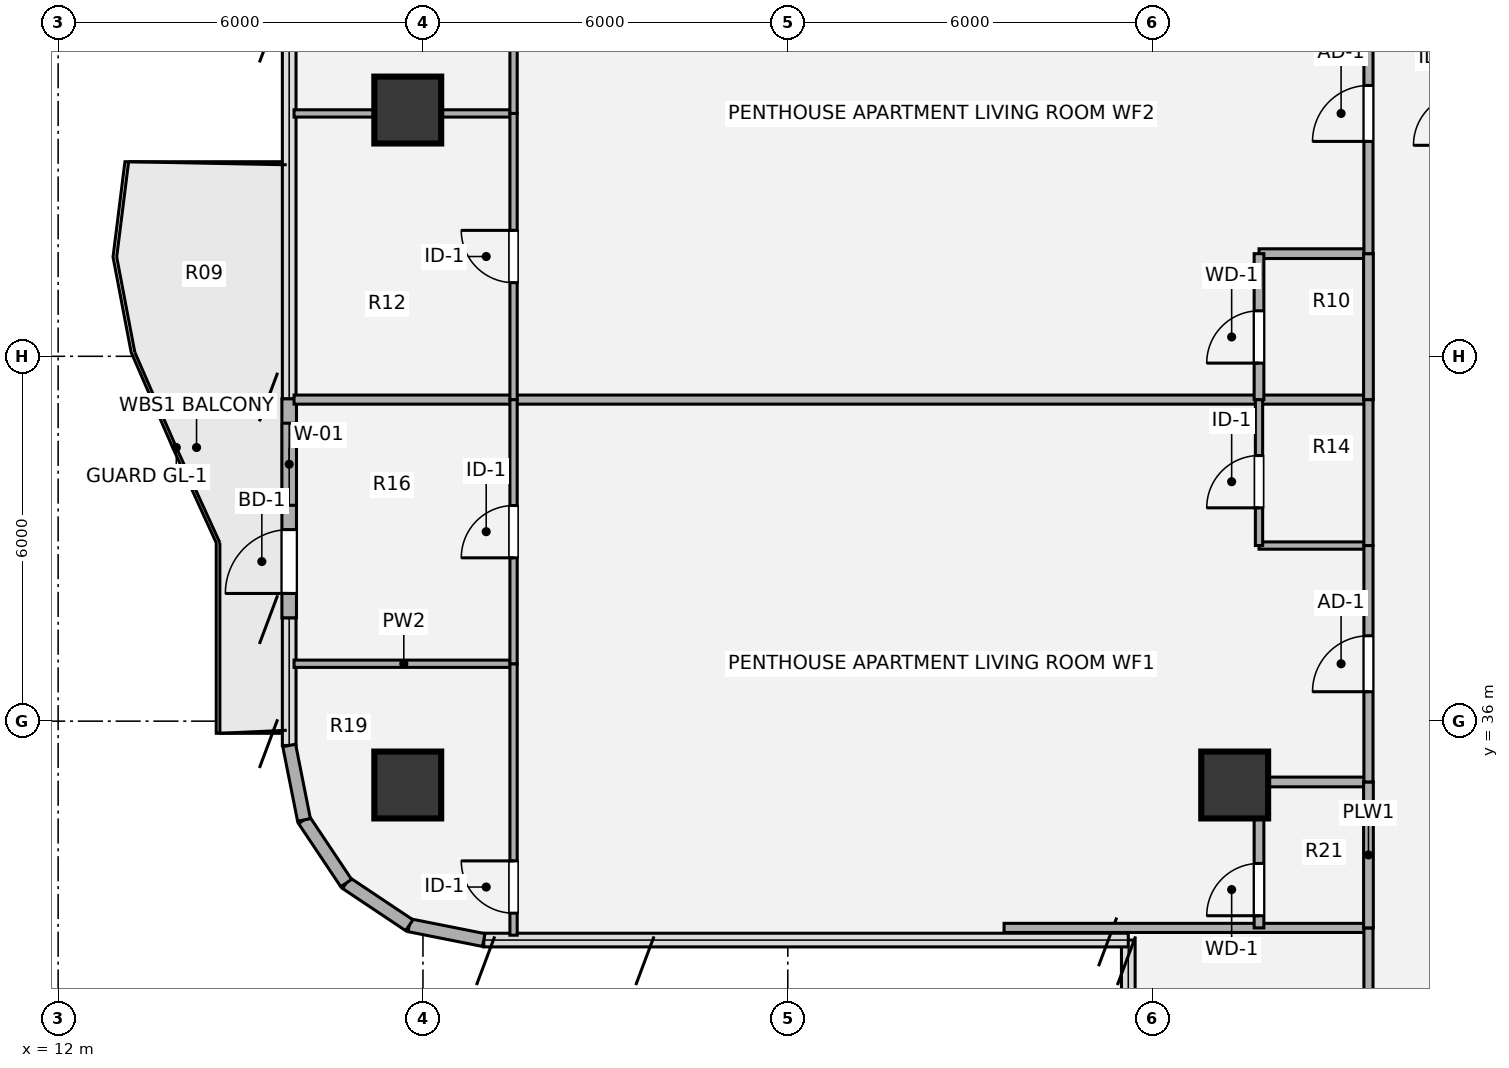
"""IFC4 building model, lengths in metres.
Left out: names, types, materials, properties, quantities, classifications, styles, units other than length and angle.
Written with IfcOpenShell. Run it as: python <this file> out.ifc"""

import sys

from ifc_helpers import new_model, si_unit, direction, frame, frame_2d, origin, origin_2d, place, context, subcontext, project, spatial, rectangle, hollow_circle, extrude, source, transform, mapped, element, fill, save


model = new_model("IFC4")
c1 = context("Model", 3, precision=1e-05, world=origin(), true_north=direction((0.0, 1.0)))
c2 = subcontext(c1, "Body", "Model", "MODEL_VIEW")
j1 = project(units=[si_unit("LENGTHUNIT", "METRE"), si_unit("PLANEANGLEUNIT", "RADIAN")], contexts=[c1])
p1 = place(None, origin())
s1 = spatial("IfcSite", under=j1, at=p1, CompositionType="ELEMENT")
p2 = place(p1, origin())
s2 = spatial("IfcBuilding", under=s1, at=p2, CompositionType="ELEMENT")
p3 = place(p2, frame((0.0, 0.0, 160.2)))
s3 = spatial("IfcBuildingStorey", under=s2, at=p3, CompositionType="ELEMENT", Elevation=160.2)
m1 = source(origin(), c2, "Body", "SweptSolid", [
    extrude(hollow_circle(Radius=0.55, WallThickness=0.04, at=origin_2d()), origin(), (0.0, 0.0, 1.0), 3.78),
])
for number, where, z_axis, x_axis in (
    (1, (17.75, 34.95, 0.0), (0.0, 0.0, 1.0), (1.0, 0.0, 0.0)),
    (2, (17.75, 46.05, 0.0), (0.0, 0.0, 1.0), (1.0, 0.0, 0.0)),
    (3, (31.35, 34.95, 0.0), (0.0, 0.0, 1.0), (1.0, 0.0, 0.0)),
):
    element("IfcColumn", number, at=place(p3, frame(where, z_axis=z_axis, x_axis=x_axis)), inside=s3, PredefinedType="COLUMN", context=c2, shape_type="MappedRepresentation", body=[
        mapped(m1, transform((0.0, 0.0, 0.0), x_axis=(1.0, 0.0, 0.0), y_axis=(0.0, 1.0, 0.0), z_axis=(0.0, 0.0, 1.0), scale=1.0)),
    ])
for number, where, z_axis, x_axis in (
    (4, (19.0, 32.4, 0.0), (0.0, 0.0, 1.0), (-0.981, 0.195, 0.0)),
    (5, (17.775, 32.644, 0.0), (0.0, 0.0, 1.0), (-0.831, 0.556, 0.0)),
    (6, (16.737, 33.337, 0.0), (0.0, 0.0, 1.0), (-0.556, 0.831, 0.0)),
    (7, (16.044, 34.375, 0.0), (0.0, 0.0, 1.0), (-0.195, 0.981, 0.0)),
):
    element("IfcWall", number, at=place(p3, frame(where, z_axis=z_axis, x_axis=x_axis)), inside=s3, PredefinedType="SOLIDWALL", context=c2, shape_type="SweptSolid", body=[
        extrude(rectangle(XDim=1.249, YDim=0.215, at=frame_2d((0.624, 0.0))), origin(), (0.0, 0.0, 1.0), 3.53),
    ])
p4 = place(p3, frame((15.8, 37.7, 0.0), z_axis=(0.0, 0.0, 1.0), x_axis=(0.0, 1.0, 0.0)))
e8 = element("IfcWall", 8, at=p4, inside=s3, PredefinedType="SOLIDWALL", context=c2, shape_type="SweptSolid", body=[
    extrude(rectangle(XDim=3.6, YDim=0.24, at=frame_2d((1.8, 0.0))), origin(), (0.0, 0.0, 1.0), 3.53),
])
p5 = place(p4, frame((0.4, 0.0, 0.0)))
e9 = element("IfcOpeningElement", 9, at=p5, cuts=e8, PredefinedType="OPENING", context=c2, shape_type="SweptSolid", body=[
    extrude(rectangle(XDim=1.05, YDim=2.15, at=origin_2d()), frame((0.525, 0.13, 1.075), z_axis=(0.0, -1.0, 0.0), x_axis=(1.0, 0.0, 0.0)), (0.0, 0.0, 1.0), 0.26),
])
p6 = place(p4, frame((1.85, 0.0, 0.85)))
e10 = element("IfcOpeningElement", 10, at=p6, cuts=e8, PredefinedType="OPENING", context=c2, shape_type="SweptSolid", body=[
    extrude(rectangle(XDim=1.35, YDim=1.35, at=origin_2d()), frame((0.675, 0.13, 0.675), z_axis=(0.0, -1.0, 0.0), x_axis=(1.0, 0.0, 0.0)), (0.0, 0.0, 1.0), 0.26),
])
p7 = place(p3, frame((27.557, 32.6, 0.0), z_axis=(0.0, 0.0, 1.0), x_axis=(1.0, 0.0, 0.0)))
e11 = element("IfcWall", 11, at=p7, inside=s3, PredefinedType="PARTITIONING", context=c2, shape_type="SweptSolid", body=[
    extrude(rectangle(XDim=5.993, YDim=0.15, at=frame_2d((2.997, 0.0))), origin(), (0.0, 0.0, 1.0), 3.5),
])
p8 = place(p3, frame((31.75, 35.0, 0.0), z_axis=(0.0, 0.0, 1.0), x_axis=(1.0, 0.0, 0.0)))
e12 = element("IfcWall", 12, at=p8, inside=s3, PredefinedType="PLUMBINGWALL", context=c2, shape_type="SweptSolid", body=[
    extrude(rectangle(XDim=1.8, YDim=0.16, at=frame_2d((0.9, 0.0))), origin(), (0.0, 0.0, 1.0), 2.903),
])
p9 = place(p3, frame((15.88, 36.944, 0.0), z_axis=(0.0, 0.0, 1.0), x_axis=(1.0, 0.0, 0.0)))
e13 = element("IfcWall", 13, at=p9, inside=s3, PredefinedType="PARTITIONING", context=c2, shape_type="SweptSolid", body=[
    extrude(rectangle(XDim=3.61, YDim=0.12, at=frame_2d((1.805, 0.0))), origin(), (0.0, 0.0, 1.0), 2.982),
])
p10 = place(p3, frame((31.75, 38.888, 0.0), z_axis=(0.0, 0.0, 1.0), x_axis=(1.0, 0.0, 0.0)))
e14 = element("IfcWall", 14, at=p10, inside=s3, PredefinedType="PARTITIONING", context=c2, shape_type="SweptSolid", body=[
    extrude(rectangle(XDim=1.8, YDim=0.12, at=frame_2d((0.9, 0.0))), origin(), (0.0, 0.0, 1.0), 3.259),
])
p11 = place(p3, frame((15.88, 41.288, 0.0), z_axis=(0.0, 0.0, 1.0), x_axis=(1.0, 0.0, 0.0)))
e15 = element("IfcWall", 15, at=p11, inside=s3, PredefinedType="PARTITIONING", context=c2, shape_type="SweptSolid", body=[
    extrude(rectangle(XDim=17.67, YDim=0.15, at=frame_2d((8.835, 0.0))), origin(), (0.0, 0.0, 1.0), 2.982),
])
p12 = place(p3, frame((31.75, 43.688, 0.0), z_axis=(0.0, 0.0, 1.0), x_axis=(1.0, 0.0, 0.0)))
e16 = element("IfcWall", 16, at=p12, inside=s3, PredefinedType="PLUMBINGWALL", context=c2, shape_type="SweptSolid", body=[
    extrude(rectangle(XDim=1.8, YDim=0.16, at=frame_2d((0.9, 0.0))), origin(), (0.0, 0.0, 1.0), 3.259),
])
p13 = place(p3, frame((15.88, 45.994, 0.0), z_axis=(0.0, 0.0, 1.0), x_axis=(1.0, 0.0, 0.0)))
e17 = element("IfcWall", 17, at=p13, inside=s3, PredefinedType="PARTITIONING", context=c2, shape_type="SweptSolid", body=[
    extrude(rectangle(XDim=3.61, YDim=0.12, at=frame_2d((1.805, 0.0))), origin(), (0.0, 0.0, 1.0), 2.903),
])
p14 = place(p3, frame((19.49, 32.48, 0.0), z_axis=(0.0, 0.0, 1.0), x_axis=(0.0, 1.0, 0.0)))
e18 = element("IfcWall", 18, at=p14, inside=s3, PredefinedType="PARTITIONING", context=c2, shape_type="SweptSolid", body=[
    extrude(rectangle(XDim=4.464, YDim=0.12, at=frame_2d((2.232, 0.0))), origin(), (0.0, 0.0, 1.0), 3.5),
])
p15 = place(p14, frame((0.362, 0.0, 0.0)))
e19 = element("IfcOpeningElement", 19, at=p15, cuts=e18, PredefinedType="OPENING", context=c2, shape_type="SweptSolid", body=[
    extrude(rectangle(XDim=0.86, YDim=2.1, at=origin_2d()), frame((0.43, 0.07, 1.05), z_axis=(0.0, -1.0, 0.0), x_axis=(1.0, 0.0, 0.0)), (0.0, 0.0, 1.0), 0.14),
])
p16 = place(p3, frame((19.49, 36.944, 0.0), z_axis=(0.0, 0.0, 1.0), x_axis=(0.0, 1.0, 0.0)))
e20 = element("IfcWall", 20, at=p16, inside=s3, PredefinedType="PARTITIONING", context=c2, shape_type="SweptSolid", body=[
    extrude(rectangle(XDim=4.344, YDim=0.12, at=frame_2d((2.172, 0.0))), origin(), (0.0, 0.0, 1.0), 3.5),
])
p17 = place(p16, frame((1.742, 0.0, 0.0)))
e21 = element("IfcOpeningElement", 21, at=p17, cuts=e20, PredefinedType="OPENING", context=c2, shape_type="SweptSolid", body=[
    extrude(rectangle(XDim=0.86, YDim=2.1, at=origin_2d()), frame((0.43, 0.07, 1.05), z_axis=(0.0, -1.0, 0.0), x_axis=(1.0, 0.0, 0.0)), (0.0, 0.0, 1.0), 0.14),
])
p18 = place(p3, frame((19.49, 41.288, 0.0), z_axis=(0.0, 0.0, 1.0), x_axis=(0.0, 1.0, 0.0)))
e22 = element("IfcWall", 22, at=p18, inside=s3, PredefinedType="PARTITIONING", context=c2, shape_type="SweptSolid", body=[
    extrude(rectangle(XDim=4.706, YDim=0.12, at=frame_2d((2.353, 0.0))), origin(), (0.0, 0.0, 1.0), 3.5),
])
p19 = place(p18, frame((1.923, 0.0, 0.0)))
e23 = element("IfcOpeningElement", 23, at=p19, cuts=e22, PredefinedType="OPENING", context=c2, shape_type="SweptSolid", body=[
    extrude(rectangle(XDim=0.86, YDim=2.1, at=origin_2d()), frame((0.43, 0.07, 1.05), z_axis=(0.0, -1.0, 0.0), x_axis=(1.0, 0.0, 0.0)), (0.0, 0.0, 1.0), 0.14),
])
p20 = place(p3, frame((19.49, 45.994, 0.0), z_axis=(0.0, 0.0, 1.0), x_axis=(0.0, 1.0, 0.0)))
e24 = element("IfcWall", 24, at=p20, inside=s3, PredefinedType="PARTITIONING", context=c2, shape_type="SweptSolid", body=[
    extrude(rectangle(XDim=4.706, YDim=0.12, at=frame_2d((2.353, 0.0))), origin(), (0.0, 0.0, 1.0), 3.5),
])
p21 = place(p20, frame((1.923, 0.0, 0.0)))
e25 = element("IfcOpeningElement", 25, at=p21, cuts=e24, PredefinedType="OPENING", context=c2, shape_type="SweptSolid", body=[
    extrude(rectangle(XDim=0.86, YDim=2.1, at=origin_2d()), frame((0.43, 0.07, 1.05), z_axis=(0.0, -1.0, 0.0), x_axis=(1.0, 0.0, 0.0)), (0.0, 0.0, 1.0), 0.14),
])
p22 = place(p3, frame((31.75, 32.6, 0.0), z_axis=(0.0, 0.0, 1.0), x_axis=(0.0, 1.0, 0.0)))
e26 = element("IfcWall", 26, at=p22, inside=s3, PredefinedType="PLUMBINGWALL", context=c2, shape_type="SweptSolid", body=[
    extrude(rectangle(XDim=2.4, YDim=0.16, at=frame_2d((1.2, 0.0))), origin(), (0.0, 0.0, 1.0), 3.5),
])
p23 = place(p22, frame((0.2, 0.0, 0.0)))
e27 = element("IfcOpeningElement", 27, at=p23, cuts=e26, PredefinedType="OPENING", context=c2, shape_type="SweptSolid", body=[
    extrude(rectangle(XDim=0.86, YDim=2.1, at=origin_2d()), frame((0.43, 0.09, 1.05), z_axis=(0.0, -1.0, 0.0), x_axis=(1.0, 0.0, 0.0)), (0.0, 0.0, 1.0), 0.18),
])
p24 = place(p3, frame((31.75, 38.888, 0.0), z_axis=(0.0, 0.0, 1.0), x_axis=(0.0, 1.0, 0.0)))
e28 = element("IfcWall", 28, at=p24, inside=s3, PredefinedType="PARTITIONING", context=c2, shape_type="SweptSolid", body=[
    extrude(rectangle(XDim=2.4, YDim=0.12, at=frame_2d((1.2, 0.0))), origin(), (0.0, 0.0, 1.0), 3.5),
])
p25 = place(p24, frame((0.62, 0.0, 0.0)))
e29 = element("IfcOpeningElement", 29, at=p25, cuts=e28, PredefinedType="OPENING", context=c2, shape_type="SweptSolid", body=[
    extrude(rectangle(XDim=0.86, YDim=2.1, at=origin_2d()), frame((0.43, 0.07, 1.05), z_axis=(0.0, -1.0, 0.0), x_axis=(1.0, 0.0, 0.0)), (0.0, 0.0, 1.0), 0.14),
])
p26 = place(p3, frame((31.75, 41.288, 0.0), z_axis=(0.0, 0.0, 1.0), x_axis=(0.0, 1.0, 0.0)))
e30 = element("IfcWall", 30, at=p26, inside=s3, PredefinedType="PLUMBINGWALL", context=c2, shape_type="SweptSolid", body=[
    extrude(rectangle(XDim=2.4, YDim=0.16, at=frame_2d((1.2, 0.0))), origin(), (0.0, 0.0, 1.0), 3.5),
])
p27 = place(p26, frame((0.6, 0.0, 0.0)))
e31 = element("IfcOpeningElement", 31, at=p27, cuts=e30, PredefinedType="OPENING", context=c2, shape_type="SweptSolid", body=[
    extrude(rectangle(XDim=0.86, YDim=2.1, at=origin_2d()), frame((0.43, 0.09, 1.05), z_axis=(0.0, -1.0, 0.0), x_axis=(1.0, 0.0, 0.0)), (0.0, 0.0, 1.0), 0.18),
])
p28 = place(p3, frame((33.55, 21.2, 0.0), z_axis=(0.0, 0.0, 1.0), x_axis=(0.0, 1.0, 0.0)))
e32 = element("IfcWall", 32, at=p28, inside=s3, PredefinedType="PARTITIONING", context=c2, shape_type="SweptSolid", body=[
    extrude(rectangle(XDim=11.4, YDim=0.15, at=frame_2d((5.7, 0.0))), origin(), (0.0, 0.0, 1.0), 3.5),
])
p29 = place(p28, frame((5.14, 0.0, 0.0)))
e33 = element("IfcOpeningElement", 33, at=p29, cuts=e32, PredefinedType="OPENING", context=c2, shape_type="SweptSolid", body=[
    extrude(rectangle(XDim=0.86, YDim=2.1, at=origin_2d()), frame((0.43, 0.085, 1.05), z_axis=(0.0, -1.0, 0.0), x_axis=(1.0, 0.0, 0.0)), (0.0, 0.0, 1.0), 0.17),
])
p30 = place(p3, frame((33.55, 32.6, 0.0), z_axis=(0.0, 0.0, 1.0), x_axis=(0.0, 1.0, 0.0)))
e34 = element("IfcWall", 34, at=p30, inside=s3, PredefinedType="PLUMBINGWALL", context=c2, shape_type="SweptSolid", body=[
    extrude(rectangle(XDim=2.4, YDim=0.16, at=frame_2d((1.2, 0.0))), origin(), (0.0, 0.0, 1.0), 3.5),
])
p31 = place(p3, frame((33.55, 35.0, 0.0), z_axis=(0.0, 0.0, 1.0), x_axis=(0.0, 1.0, 0.0)))
e35 = element("IfcWall", 35, at=p31, inside=s3, PredefinedType="PARTITIONING", context=c2, shape_type="SweptSolid", body=[
    extrude(rectangle(XDim=3.888, YDim=0.15, at=frame_2d((1.944, 0.0))), origin(), (0.0, 0.0, 1.0), 3.5),
])
p32 = place(p31, frame((1.484, 0.0, 0.0)))
e36 = element("IfcOpeningElement", 36, at=p32, cuts=e35, PredefinedType="OPENING", context=c2, shape_type="SweptSolid", body=[
    extrude(rectangle(XDim=0.92, YDim=2.1, at=origin_2d()), frame((0.46, 0.085, 1.05), z_axis=(0.0, -1.0, 0.0), x_axis=(1.0, 0.0, 0.0)), (0.0, 0.0, 1.0), 0.17),
])
p33 = place(p3, frame((33.55, 38.888, 0.0), z_axis=(0.0, 0.0, 1.0), x_axis=(0.0, 1.0, 0.0)))
e37 = element("IfcWall", 37, at=p33, inside=s3, PredefinedType="PARTITIONING", context=c2, shape_type="SweptSolid", body=[
    extrude(rectangle(XDim=2.4, YDim=0.15, at=frame_2d((1.2, 0.0))), origin(), (0.0, 0.0, 1.0), 3.5),
])
p34 = place(p3, frame((33.55, 41.288, 0.0), z_axis=(0.0, 0.0, 1.0), x_axis=(0.0, 1.0, 0.0)))
e38 = element("IfcWall", 38, at=p34, inside=s3, PredefinedType="PLUMBINGWALL", context=c2, shape_type="SweptSolid", body=[
    extrude(rectangle(XDim=2.4, YDim=0.16, at=frame_2d((1.2, 0.0))), origin(), (0.0, 0.0, 1.0), 3.5),
])
p35 = place(p3, frame((33.55, 43.688, 0.0), z_axis=(0.0, 0.0, 1.0), x_axis=(0.0, 1.0, 0.0)))
e39 = element("IfcWall", 39, at=p35, inside=s3, PredefinedType="PARTITIONING", context=c2, shape_type="SweptSolid", body=[
    extrude(rectangle(XDim=4.612, YDim=0.15, at=frame_2d((2.306, 0.0))), origin(), (0.0, 0.0, 1.0), 3.5),
])
p36 = place(p35, frame((1.846, 0.0, 0.0)))
e40 = element("IfcOpeningElement", 40, at=p36, cuts=e39, PredefinedType="OPENING", context=c2, shape_type="SweptSolid", body=[
    extrude(rectangle(XDim=0.92, YDim=2.1, at=origin_2d()), frame((0.46, 0.085, 1.05), z_axis=(0.0, -1.0, 0.0), x_axis=(1.0, 0.0, 0.0)), (0.0, 0.0, 1.0), 0.17),
])
m2 = source(origin(), c2, "Body", "SweptSolid", [
    extrude(rectangle(XDim=1.05, YDim=2.15, at=origin_2d()), frame((0.525, 0.025, 1.075), z_axis=(0.0, -1.0, 0.0), x_axis=(1.0, 0.0, 0.0)), (0.0, 0.0, 1.0), 0.05),
])
p37 = place(p5, origin())
e41 = element("IfcDoor", 41, at=p37, inside=s3, OperationType="SINGLE_SWING_LEFT", PredefinedType="DOOR", context=c2, shape_type="MappedRepresentation", body=[
    mapped(m2, transform((0.0, 0.0, 0.0), x_axis=(1.0, 0.0, 0.0), y_axis=(0.0, 1.0, 0.0), z_axis=(0.0, 0.0, 1.0), scale=1.0)),
])
fill(e9, e41)
m3 = source(origin(), c2, "Body", "SweptSolid", [
    extrude(rectangle(XDim=1.35, YDim=1.35, at=origin_2d()), frame((0.675, 0.03, 0.675), z_axis=(0.0, -1.0, 0.0), x_axis=(1.0, 0.0, 0.0)), (0.0, 0.0, 1.0), 0.06),
])
p38 = place(p6, origin())
e42 = element("IfcWindow", 42, at=p38, inside=s3, PartitioningType="SINGLE_PANEL", PredefinedType="WINDOW", context=c2, shape_type="MappedRepresentation", body=[
    mapped(m3, transform((0.0, 0.0, 0.0), x_axis=(1.0, 0.0, 0.0), y_axis=(0.0, 1.0, 0.0), z_axis=(0.0, 0.0, 1.0), scale=1.0)),
])
fill(e10, e42)
m4 = source(origin(), c2, "Body", "SweptSolid", [
    extrude(rectangle(XDim=0.86, YDim=2.1, at=origin_2d()), frame((0.43, 0.025, 1.05), z_axis=(0.0, -1.0, 0.0), x_axis=(1.0, 0.0, 0.0)), (0.0, 0.0, 1.0), 0.05),
])
p39 = place(p15, origin())
e43 = element("IfcDoor", 43, at=p39, inside=s3, OperationType="SINGLE_SWING_RIGHT", PredefinedType="DOOR", context=c2, shape_type="MappedRepresentation", body=[
    mapped(m4, transform((0.0, 0.0, 0.0), x_axis=(1.0, 0.0, 0.0), y_axis=(0.0, 1.0, 0.0), z_axis=(0.0, 0.0, 1.0), scale=1.0)),
])
fill(e19, e43)
p40 = place(p17, origin())
e44 = element("IfcDoor", 44, at=p40, inside=s3, OperationType="SINGLE_SWING_LEFT", PredefinedType="DOOR", context=c2, shape_type="MappedRepresentation", body=[
    mapped(m4, transform((0.0, 0.0, 0.0), x_axis=(1.0, 0.0, 0.0), y_axis=(0.0, 1.0, 0.0), z_axis=(0.0, 0.0, 1.0), scale=1.0)),
])
fill(e21, e44)
p41 = place(p19, origin())
e45 = element("IfcDoor", 45, at=p41, inside=s3, OperationType="SINGLE_SWING_RIGHT", PredefinedType="DOOR", context=c2, shape_type="MappedRepresentation", body=[
    mapped(m4, transform((0.0, 0.0, 0.0), x_axis=(1.0, 0.0, 0.0), y_axis=(0.0, 1.0, 0.0), z_axis=(0.0, 0.0, 1.0), scale=1.0)),
])
fill(e23, e45)
m5 = source(origin(), c2, "Body", "SweptSolid", [
    extrude(rectangle(XDim=0.86, YDim=2.1, at=origin_2d()), frame((0.43, 0.025, 1.05), z_axis=(0.0, -1.0, 0.0), x_axis=(1.0, 0.0, 0.0)), (0.0, 0.0, 1.0), 0.05),
])
p42 = place(p23, origin())
e46 = element("IfcDoor", 46, at=p42, inside=s3, OperationType="SINGLE_SWING_LEFT", PredefinedType="DOOR", context=c2, shape_type="MappedRepresentation", body=[
    mapped(m5, transform((0.0, 0.0, 0.0), x_axis=(1.0, 0.0, 0.0), y_axis=(0.0, 1.0, 0.0), z_axis=(0.0, 0.0, 1.0), scale=1.0)),
])
fill(e27, e46)
p43 = place(p25, origin())
e47 = element("IfcDoor", 47, at=p43, inside=s3, OperationType="SINGLE_SWING_LEFT", PredefinedType="DOOR", context=c2, shape_type="MappedRepresentation", body=[
    mapped(m4, transform((0.0, 0.0, 0.0), x_axis=(1.0, 0.0, 0.0), y_axis=(0.0, 1.0, 0.0), z_axis=(0.0, 0.0, 1.0), scale=1.0)),
])
fill(e29, e47)
p44 = place(p27, origin())
e48 = element("IfcDoor", 48, at=p44, inside=s3, OperationType="SINGLE_SWING_LEFT", PredefinedType="DOOR", context=c2, shape_type="MappedRepresentation", body=[
    mapped(m5, transform((0.0, 0.0, 0.0), x_axis=(1.0, 0.0, 0.0), y_axis=(0.0, 1.0, 0.0), z_axis=(0.0, 0.0, 1.0), scale=1.0)),
])
fill(e31, e48)
m6 = source(origin(), c2, "Body", "SweptSolid", [
    extrude(rectangle(XDim=0.92, YDim=2.1, at=origin_2d()), frame((0.46, 0.025, 1.05), z_axis=(0.0, -1.0, 0.0), x_axis=(1.0, 0.0, 0.0)), (0.0, 0.0, 1.0), 0.05),
])
p45 = place(p32, origin())
e49 = element("IfcDoor", 49, at=p45, inside=s3, OperationType="SINGLE_SWING_LEFT", PredefinedType="DOOR", context=c2, shape_type="MappedRepresentation", body=[
    mapped(m6, transform((0.0, 0.0, 0.0), x_axis=(1.0, 0.0, 0.0), y_axis=(0.0, 1.0, 0.0), z_axis=(0.0, 0.0, 1.0), scale=1.0)),
])
fill(e36, e49)
p46 = place(p36, origin())
e50 = element("IfcDoor", 50, at=p46, inside=s3, OperationType="SINGLE_SWING_LEFT", PredefinedType="DOOR", context=c2, shape_type="MappedRepresentation", body=[
    mapped(m6, transform((0.0, 0.0, 0.0), x_axis=(1.0, 0.0, 0.0), y_axis=(0.0, 1.0, 0.0), z_axis=(0.0, 0.0, 1.0), scale=1.0)),
])
fill(e40, e50)
save(model, sys.argv[1])
